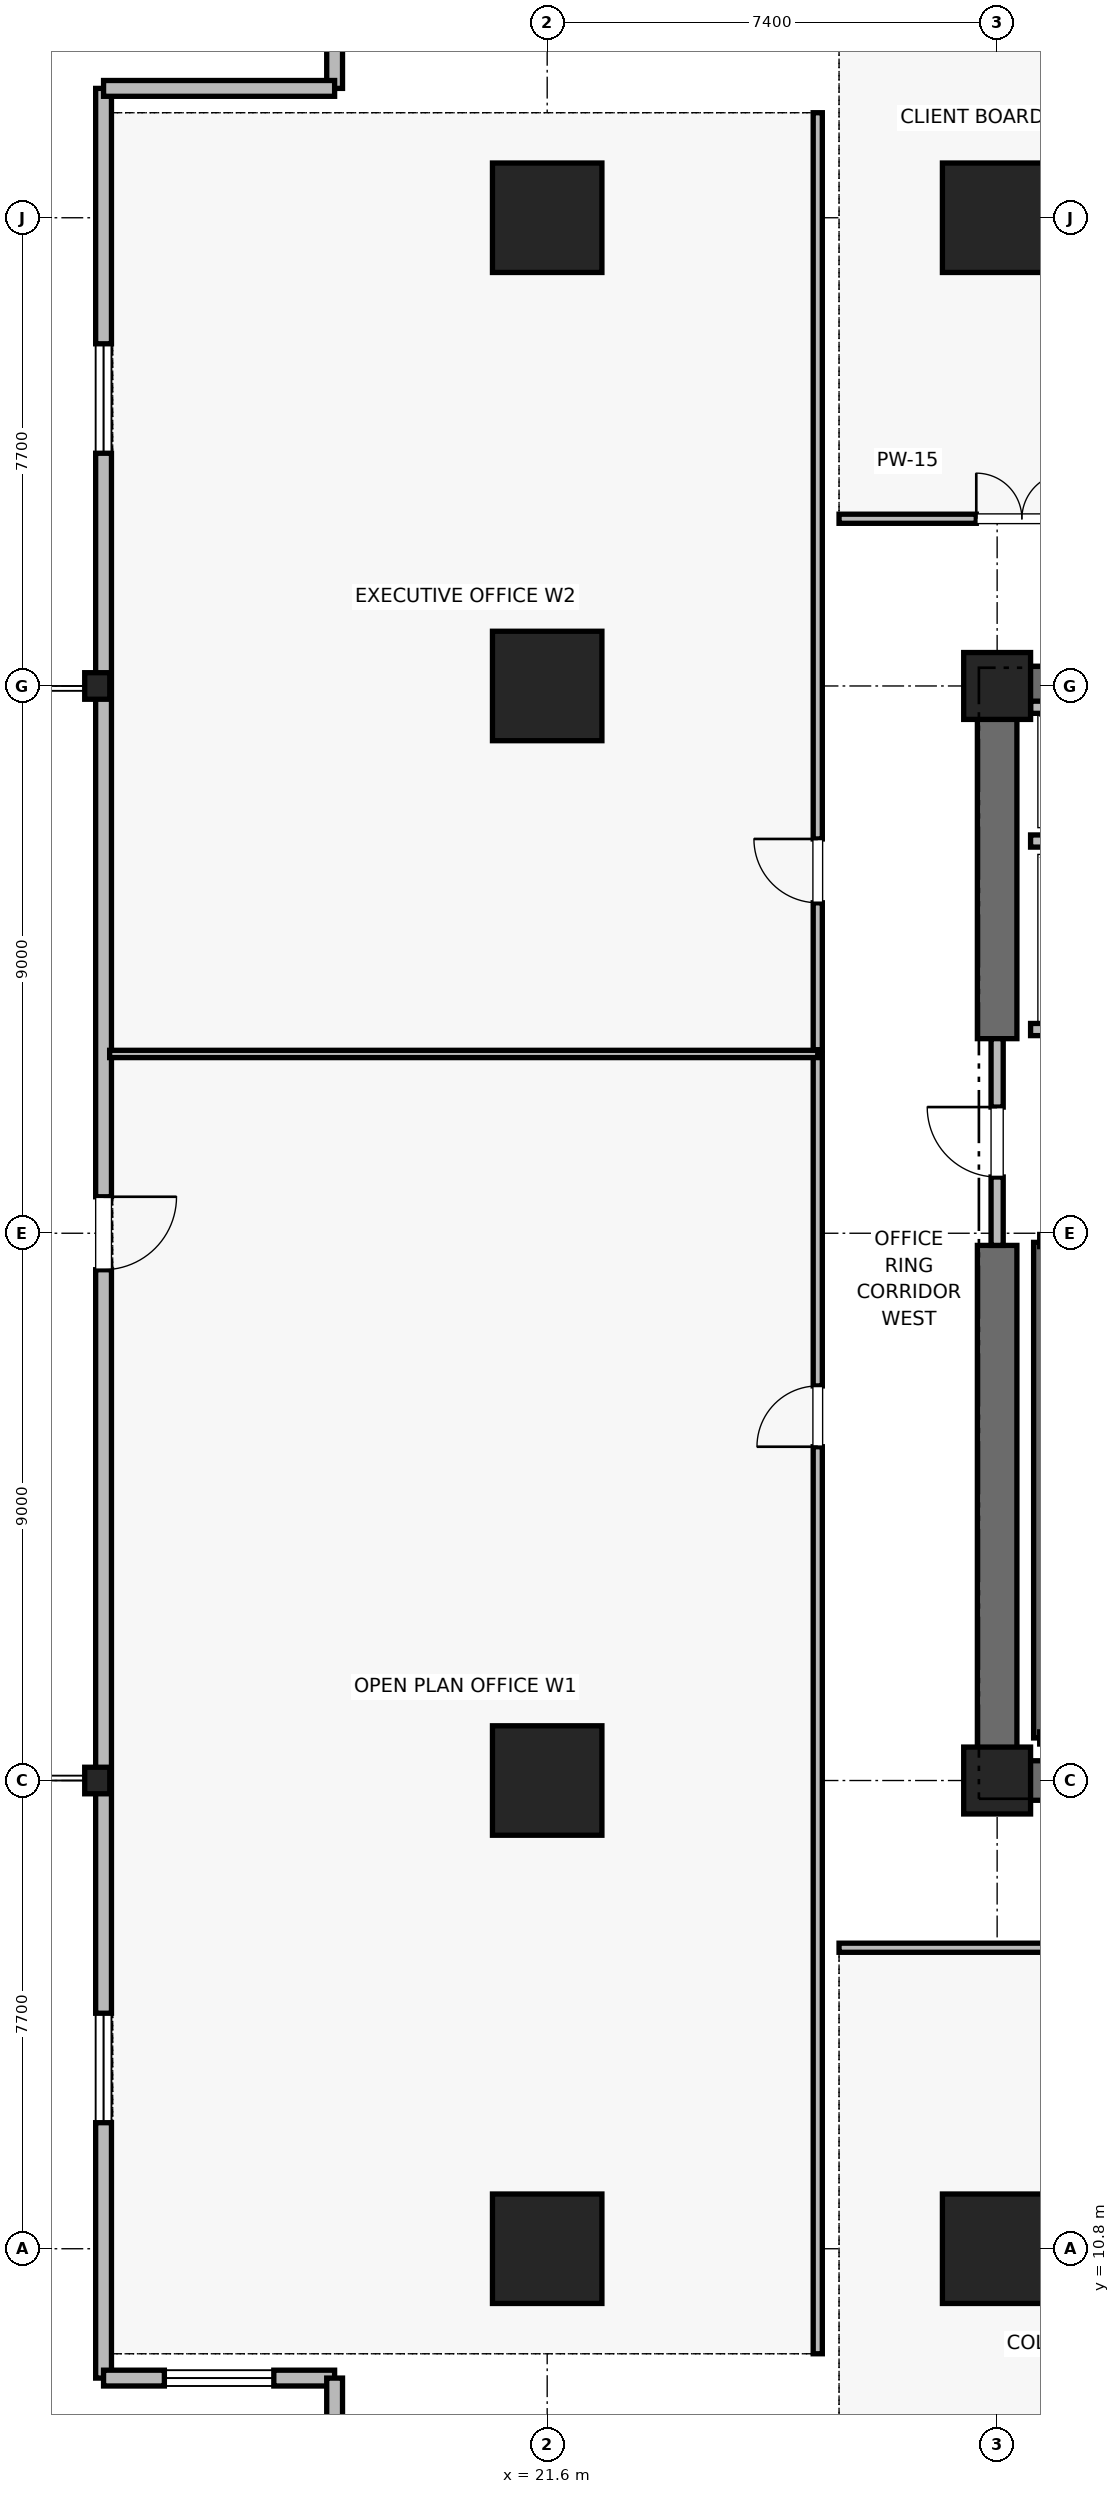
"""IFC4 building model, lengths in metres.
Left out: names, types, materials, properties, quantities, classifications, styles, units other than length and angle.
Written with IfcOpenShell. Run it as: python <this file> out.ifc"""

import sys

from ifc_helpers import new_model, si_unit, direction, frame, frame_2d, origin, origin_2d, place, context, subcontext, project, spatial, rectangle, i_section, extrude, element, fill, save


model = new_model("IFC4")
c1 = context("Model", 3, precision=1e-05, world=origin(), true_north=direction((0.0, 1.0)))
c2 = subcontext(c1, "Body", "Model", "MODEL_VIEW")
j1 = project(units=[si_unit("LENGTHUNIT", "METRE"), si_unit("PLANEANGLEUNIT", "RADIAN")], contexts=[c1])
p1 = place(None, origin())
s1 = spatial("IfcSite", under=j1, at=p1, CompositionType="ELEMENT")
p2 = place(p1, origin())
s2 = spatial("IfcBuilding", under=s1, at=p2, CompositionType="ELEMENT")
p3 = place(p2, frame((0.0, 0.0, 55.6)))
s3 = spatial("IfcBuildingStorey", under=s2, at=p3, CompositionType="ELEMENT", Elevation=55.6)
for number, where, z_axis, x_axis in (
    (1, (29.0, 10.8, 0.0), (0.0, 0.0, 1.0), (1.0, 0.0, 0.0)),
    (2, (29.0, 44.2, 0.0), (0.0, 0.0, 1.0), (1.0, 0.0, 0.0)),
    (3, (21.6, 18.5, 0.0), (0.0, 0.0, 1.0), (1.0, 0.0, 0.0)),
    (4, (21.6, 36.5, 0.0), (0.0, 0.0, 1.0), (1.0, 0.0, 0.0)),
    (5, (21.6, 10.8, 0.0), (0.0, 0.0, 1.0), (1.0, 0.0, 0.0)),
    (6, (21.6, 44.2, 0.0), (0.0, 0.0, 1.0), (1.0, 0.0, 0.0)),
):
    element("IfcColumn", number, at=place(p3, frame(where, z_axis=z_axis, x_axis=x_axis)), inside=s3, PredefinedType="COLUMN", context=c2, shape_type="SweptSolid", body=[
        extrude(rectangle(XDim=1.8, YDim=1.8, at=origin_2d()), origin(), (0.0, 0.0, 1.0), 4.0),
    ])
for number, where, z_axis, x_axis in (
    (7, (14.2, 18.5, 0.0), (0.0, 0.0, 1.0), (1.0, 0.0, 0.0)),
    (8, (14.2, 36.5, 0.0), (0.0, 0.0, 1.0), (1.0, 0.0, 0.0)),
):
    element("IfcColumn", number, at=place(p3, frame(where, z_axis=z_axis, x_axis=x_axis)), inside=s3, PredefinedType="COLUMN", context=c2, shape_type="SweptSolid", body=[
        extrude(i_section(OverallWidth=0.412, OverallDepth=0.437, WebThickness=0.036, FlangeThickness=0.058, FilletRadius=0.015, at=origin_2d()), origin(), (0.0, 0.0, 1.0), 4.0),
    ])
for number, where, z_axis, x_axis in (
    (9, (29.0, 18.5, 0.0), (0.0, 0.0, 1.0), (1.0, 0.0, 0.0)),
    (10, (29.0, 36.5, 0.0), (0.0, 0.0, 1.0), (1.0, 0.0, 0.0)),
):
    element("IfcColumn", number, at=place(p3, frame(where, z_axis=z_axis, x_axis=x_axis)), inside=s3, PredefinedType="PILASTER", context=c2, shape_type="SweptSolid", body=[
        extrude(rectangle(XDim=1.1, YDim=1.1, at=origin_2d()), origin(), (0.0, 0.0, 1.0), 4.0),
    ])
p4 = place(p3, frame((29.0, 18.5, 0.0), z_axis=(0.0, 0.0, 1.0), x_axis=(1.0, 0.0, 0.0)))
e11 = element("IfcWall", 11, at=p4, inside=s3, PredefinedType="SHEAR", context=c2, shape_type="SweptSolid", body=[
    extrude(rectangle(XDim=9.2, YDim=0.65, at=frame_2d((4.6, 0.0))), origin(), (0.0, 0.0, 1.0), 3.76),
])
p5 = place(p3, frame((29.0, 36.5, 0.0), z_axis=(0.0, 0.0, 1.0), x_axis=(1.0, 0.0, 0.0)))
e12 = element("IfcWall", 12, at=p5, inside=s3, PredefinedType="SHEAR", context=c2, shape_type="SweptSolid", body=[
    extrude(rectangle(XDim=5.8, YDim=0.65, at=frame_2d((2.9, 0.0))), origin(), (0.0, 0.0, 1.0), 3.76),
])
p6 = place(p3, frame((29.0, 18.5, 0.0), z_axis=(0.0, 0.0, 1.0), x_axis=(0.0, 1.0, 0.0)))
e13 = element("IfcWall", 13, at=p6, inside=s3, PredefinedType="SHEAR", context=c2, shape_type="SweptSolid", body=[
    extrude(rectangle(XDim=8.8, YDim=0.65, at=frame_2d((4.4, 0.0))), origin(), (0.0, 0.0, 1.0), 3.76),
])
p7 = place(p3, frame((29.0, 30.7, 0.0), z_axis=(0.0, 0.0, 1.0), x_axis=(0.0, 1.0, 0.0)))
e14 = element("IfcWall", 14, at=p7, inside=s3, PredefinedType="SHEAR", context=c2, shape_type="SweptSolid", body=[
    extrude(rectangle(XDim=5.8, YDim=0.65, at=frame_2d((2.9, 0.0))), origin(), (0.0, 0.0, 1.0), 3.76),
])
p8 = place(p3, frame((14.304, 46.327, 0.0), z_axis=(0.0, 0.0, 1.0), x_axis=(0.0, -1.0, 0.0)))
e15 = element("IfcWall", 15, at=p8, inside=s3, PredefinedType="PARAPET", context=c2, shape_type="SweptSolid", body=[
    extrude(rectangle(XDim=37.654, YDim=0.26, at=frame_2d((18.827, 0.0))), origin(), (0.0, 0.0, 1.0), 2.889),
])
p9 = place(p8, frame((4.2, 0.0, 0.85)))
e16 = element("IfcOpeningElement", 16, at=p9, cuts=e15, PredefinedType="OPENING", context=c2, shape_type="SweptSolid", body=[
    extrude(rectangle(XDim=1.8, YDim=2.2, at=frame_2d((0.9, 1.1))), frame((0.0, 0.13, 0.0), z_axis=(0.0, -1.0, 0.0), x_axis=(1.0, 0.0, 0.0)), (0.0, 0.0, 1.0), 0.26),
])
p10 = place(p8, frame((18.227, 0.0, 0.0)))
e17 = element("IfcOpeningElement", 17, at=p10, cuts=e15, PredefinedType="OPENING", context=c2, shape_type="SweptSolid", body=[
    extrude(rectangle(XDim=1.2, YDim=2.2, at=frame_2d((0.6, 1.1))), frame((0.0, 0.13, 0.0), z_axis=(0.0, -1.0, 0.0), x_axis=(1.0, 0.0, 0.0)), (0.0, 0.0, 1.0), 0.26),
])
p11 = place(p8, frame((31.654, 0.0, 0.85)))
e18 = element("IfcOpeningElement", 18, at=p11, cuts=e15, PredefinedType="OPENING", context=c2, shape_type="SweptSolid", body=[
    extrude(rectangle(XDim=1.8, YDim=2.2, at=frame_2d((0.9, 1.1))), frame((0.0, 0.13, 0.0), z_axis=(0.0, -1.0, 0.0), x_axis=(1.0, 0.0, 0.0)), (0.0, 0.0, 1.0), 0.26),
])
p12 = place(p3, frame((14.304, 8.673, 0.0), z_axis=(0.0, 0.0, 1.0), x_axis=(1.0, 0.0, 0.0)))
e19 = element("IfcWall", 19, at=p12, inside=s3, PredefinedType="PARAPET", context=c2, shape_type="SweptSolid", body=[
    extrude(rectangle(XDim=3.8, YDim=0.26, at=frame_2d((1.9, 0.0))), origin(), (0.0, 0.0, 1.0), 3.76),
])
p13 = place(p12, frame((1.0, 0.0, 0.85)))
e20 = element("IfcOpeningElement", 20, at=p13, cuts=e19, PredefinedType="OPENING", context=c2, shape_type="SweptSolid", body=[
    extrude(rectangle(XDim=1.8, YDim=2.2, at=frame_2d((0.9, 1.1))), frame((0.0, 0.13, 0.0), z_axis=(0.0, -1.0, 0.0), x_axis=(1.0, 0.0, 0.0)), (0.0, 0.0, 1.0), 0.26),
])
p14 = place(p3, frame((18.104, 8.673, 0.0), z_axis=(0.0, 0.0, 1.0), x_axis=(0.0, -1.0, 0.0)))
e21 = element("IfcWall", 21, at=p14, inside=s3, PredefinedType="PARAPET", context=c2, shape_type="SweptSolid", body=[
    extrude(rectangle(XDim=3.4, YDim=0.26, at=frame_2d((1.7, 0.0))), origin(), (0.0, 0.0, 1.0), 3.76),
])
p15 = place(p3, frame((18.104, 49.727, 0.0), z_axis=(0.0, 0.0, 1.0), x_axis=(0.0, -1.0, 0.0)))
e22 = element("IfcWall", 22, at=p15, inside=s3, PredefinedType="PARAPET", context=c2, shape_type="SweptSolid", body=[
    extrude(rectangle(XDim=3.4, YDim=0.26, at=frame_2d((1.7, 0.0))), origin(), (0.0, 0.0, 1.0), 3.76),
])
p16 = place(p15, frame((0.8, 0.0, 0.85)))
e23 = element("IfcOpeningElement", 23, at=p16, cuts=e22, PredefinedType="OPENING", context=c2, shape_type="SweptSolid", body=[
    extrude(rectangle(XDim=1.8, YDim=2.2, at=frame_2d((0.9, 1.1))), frame((0.0, 0.13, 0.0), z_axis=(0.0, -1.0, 0.0), x_axis=(1.0, 0.0, 0.0)), (0.0, 0.0, 1.0), 0.26),
])
p17 = place(p3, frame((18.104, 46.327, 0.0), z_axis=(0.0, 0.0, 1.0), x_axis=(-1.0, 0.0, 0.0)))
e24 = element("IfcWall", 24, at=p17, inside=s3, PredefinedType="PARAPET", context=c2, shape_type="SweptSolid", body=[
    extrude(rectangle(XDim=3.8, YDim=0.26, at=frame_2d((1.9, 0.0))), origin(), (0.0, 0.0, 1.0), 3.76),
])
p18 = place(p3, frame((29.7, 19.2, 0.0), z_axis=(0.0, 0.0, 1.0), x_axis=(0.0, 1.0, 0.0)))
e25 = element("IfcWall", 25, at=p18, inside=s3, PredefinedType="SOLIDWALL", context=c2, shape_type="SweptSolid", body=[
    extrude(rectangle(XDim=8.15, YDim=0.2, at=frame_2d((4.075, 0.0))), origin(), (0.0, 0.0, 1.0), 3.76),
])
p19 = place(p3, frame((29.0, 27.3, 0.0), z_axis=(0.0, 0.0, 1.0), x_axis=(0.0, 1.0, 0.0)))
e26 = element("IfcWall", 26, at=p19, inside=s3, PredefinedType="PARTITIONING", context=c2, shape_type="SweptSolid", body=[
    extrude(rectangle(XDim=3.4, YDim=0.2, at=frame_2d((1.7, 0.0))), origin(), (0.0, 0.0, 1.0), 2.54),
])
p20 = place(p19, frame((1.125, 0.0, 0.0)))
e27 = element("IfcOpeningElement", 27, at=p20, cuts=e26, PredefinedType="OPENING", context=c2, shape_type="SweptSolid", body=[
    extrude(rectangle(XDim=1.15, YDim=2.2, at=frame_2d((0.575, 1.1))), frame((0.0, 0.1, 0.0), z_axis=(0.0, -1.0, 0.0), x_axis=(1.0, 0.0, 0.0)), (0.0, 0.0, 1.0), 0.2),
])
p21 = place(p3, frame((29.55, 30.85, 0.0), z_axis=(0.0, 0.0, 1.0), x_axis=(1.0, 0.0, 0.0)))
e28 = element("IfcWall", 28, at=p21, inside=s3, PredefinedType="SOLIDWALL", context=c2, shape_type="SweptSolid", body=[
    extrude(rectangle(XDim=2.6, YDim=0.2, at=frame_2d((1.3, 0.0))), origin(), (0.0, 0.0, 1.0), 2.54),
])
p22 = place(p21, frame((0.75, 0.0, 0.0)))
e29 = element("IfcOpeningElement", 29, at=p22, cuts=e28, PredefinedType="OPENING", context=c2, shape_type="SweptSolid", body=[
    extrude(rectangle(XDim=1.1, YDim=2.2, at=frame_2d((0.55, 1.1))), frame((0.0, 0.1, 0.0), z_axis=(0.0, -1.0, 0.0), x_axis=(1.0, 0.0, 0.0)), (0.0, 0.0, 1.0), 0.2),
])
p23 = place(p3, frame((29.55, 33.95, 0.0), z_axis=(0.0, 0.0, 1.0), x_axis=(1.0, 0.0, 0.0)))
e30 = element("IfcWall", 30, at=p23, inside=s3, PredefinedType="SOLIDWALL", context=c2, shape_type="SweptSolid", body=[
    extrude(rectangle(XDim=2.8, YDim=0.2, at=frame_2d((1.4, 0.0))), origin(), (0.0, 0.0, 1.0), 3.76),
])
p24 = place(p3, frame((32.35, 36.15, 0.0), z_axis=(0.0, 0.0, 1.0), x_axis=(-1.0, 0.0, 0.0)))
e31 = element("IfcWall", 31, at=p24, inside=s3, PredefinedType="SOLIDWALL", context=c2, shape_type="SweptSolid", body=[
    extrude(rectangle(XDim=2.8, YDim=0.2, at=frame_2d((1.4, 0.0))), origin(), (0.0, 0.0, 1.0), 2.889),
])
p25 = place(p3, frame((26.4, 39.25, 0.0), z_axis=(0.0, 0.0, 1.0), x_axis=(1.0, 0.0, 0.0)))
e32 = element("IfcWall", 32, at=p25, inside=s3, PredefinedType="PARTITIONING", context=c2, shape_type="SweptSolid", body=[
    extrude(rectangle(XDim=5.984, YDim=0.15, at=frame_2d((2.992, 0.0))), origin(), (0.0, 0.0, 1.0), 2.85),
])
p26 = place(p25, frame((2.257, 0.0, 0.0)))
e33 = element("IfcOpeningElement", 33, at=p26, cuts=e32, PredefinedType="OPENING", context=c2, shape_type="SweptSolid", body=[
    extrude(rectangle(XDim=1.5, YDim=2.25, at=frame_2d((0.75, 1.125))), frame((0.0, 0.075, 0.0), z_axis=(0.0, -1.0, 0.0), x_axis=(1.0, 0.0, 0.0)), (0.0, 0.0, 1.0), 0.15),
])
p27 = place(p3, frame((26.4, 15.75, 0.0), z_axis=(0.0, 0.0, 1.0), x_axis=(1.0, 0.0, 0.0)))
e34 = element("IfcWall", 34, at=p27, inside=s3, PredefinedType="PARTITIONING", context=c2, shape_type="SweptSolid", body=[
    extrude(rectangle(XDim=11.424, YDim=0.15, at=frame_2d((5.712, 0.0))), origin(), (0.0, 0.0, 1.0), 2.85),
])
p28 = place(p27, frame((5.227, 0.0, 0.0)))
e35 = element("IfcOpeningElement", 35, at=p28, cuts=e34, PredefinedType="OPENING", context=c2, shape_type="SweptSolid", body=[
    extrude(rectangle(XDim=1.0, YDim=2.15, at=frame_2d((0.5, 1.075))), frame((0.0, 0.075, 0.0), z_axis=(0.0, -1.0, 0.0), x_axis=(1.0, 0.0, 0.0)), (0.0, 0.0, 1.0), 0.15),
])
p29 = place(p3, frame((26.05, 9.073, 0.0), z_axis=(0.0, 0.0, 1.0), x_axis=(0.0, 1.0, 0.0)))
e36 = element("IfcWall", 36, at=p29, inside=s3, PredefinedType="PARTITIONING", context=c2, shape_type="SweptSolid", body=[
    extrude(rectangle(XDim=21.376, YDim=0.15, at=frame_2d((10.688, 0.0))), origin(), (0.0, 0.0, 1.0), 2.85),
])
p30 = place(p29, frame((14.917, 0.0, 0.0)))
e37 = element("IfcOpeningElement", 37, at=p30, cuts=e36, PredefinedType="OPENING", context=c2, shape_type="SweptSolid", body=[
    extrude(rectangle(XDim=1.0, YDim=2.15, at=frame_2d((0.5, 1.075))), frame((0.0, 0.075, 0.0), z_axis=(0.0, -1.0, 0.0), x_axis=(1.0, 0.0, 0.0)), (0.0, 0.0, 1.0), 0.15),
])
p31 = place(p3, frame((14.404, 30.448, 0.0), z_axis=(0.0, 0.0, 1.0), x_axis=(1.0, 0.0, 0.0)))
e38 = element("IfcWall", 38, at=p31, inside=s3, PredefinedType="PARTITIONING", context=c2, shape_type="SweptSolid", body=[
    extrude(rectangle(XDim=11.646, YDim=0.12, at=frame_2d((5.823, 0.0))), origin(), (0.0, 0.0, 1.0), 2.85),
])
p32 = place(p3, frame((26.05, 30.518, 0.0), z_axis=(0.0, 0.0, 1.0), x_axis=(0.0, 1.0, 0.0)))
e39 = element("IfcWall", 39, at=p32, inside=s3, PredefinedType="PARTITIONING", context=c2, shape_type="SweptSolid", body=[
    extrude(rectangle(XDim=15.409, YDim=0.15, at=frame_2d((7.705, 0.0))), origin(), (0.0, 0.0, 1.0), 2.85),
])
p33 = place(p32, frame((2.416, 0.0, 0.0)))
e40 = element("IfcOpeningElement", 40, at=p33, cuts=e39, PredefinedType="OPENING", context=c2, shape_type="SweptSolid", body=[
    extrude(rectangle(XDim=1.05, YDim=2.2, at=frame_2d((0.525, 1.1))), frame((0.0, 0.075, 0.0), z_axis=(0.0, -1.0, 0.0), x_axis=(1.0, 0.0, 0.0)), (0.0, 0.0, 1.0), 0.15),
])
p34 = place(p9, origin())
e41 = element("IfcWindow", 41, at=p34, inside=s3, PartitioningType="SINGLE_PANEL", PredefinedType="WINDOW", context=c2, shape_type="SweptSolid", body=[
    extrude(rectangle(XDim=1.8, YDim=2.2, at=frame_2d((0.9, 1.1))), frame((0.0, 0.03, 0.0), z_axis=(0.0, -1.0, 0.0), x_axis=(1.0, 0.0, 0.0)), (0.0, 0.0, 1.0), 0.06),
])
fill(e16, e41)
p35 = place(p10, origin())
e42 = element("IfcDoor", 42, at=p35, inside=s3, OperationType="SINGLE_SWING_LEFT", PredefinedType="DOOR", context=c2, shape_type="SweptSolid", body=[
    extrude(rectangle(XDim=1.2, YDim=2.2, at=frame_2d((0.6, 1.1))), frame((0.0, 0.025, 0.0), z_axis=(0.0, -1.0, 0.0), x_axis=(1.0, 0.0, 0.0)), (0.0, 0.0, 1.0), 0.05),
])
fill(e17, e42)
p36 = place(p11, origin())
e43 = element("IfcWindow", 43, at=p36, inside=s3, PartitioningType="SINGLE_PANEL", PredefinedType="WINDOW", context=c2, shape_type="SweptSolid", body=[
    extrude(rectangle(XDim=1.8, YDim=2.2, at=frame_2d((0.9, 1.1))), frame((0.0, 0.03, 0.0), z_axis=(0.0, -1.0, 0.0), x_axis=(1.0, 0.0, 0.0)), (0.0, 0.0, 1.0), 0.06),
])
fill(e18, e43)
p37 = place(p13, origin())
e44 = element("IfcWindow", 44, at=p37, inside=s3, PartitioningType="SINGLE_PANEL", PredefinedType="WINDOW", context=c2, shape_type="SweptSolid", body=[
    extrude(rectangle(XDim=1.8, YDim=2.2, at=frame_2d((0.9, 1.1))), frame((0.0, 0.03, 0.0), z_axis=(0.0, -1.0, 0.0), x_axis=(1.0, 0.0, 0.0)), (0.0, 0.0, 1.0), 0.06),
])
fill(e20, e44)
p38 = place(p20, origin())
e45 = element("IfcDoor", 45, at=p38, inside=s3, OperationType="SINGLE_SWING_RIGHT", PredefinedType="DOOR", context=c2, shape_type="SweptSolid", body=[
    extrude(rectangle(XDim=1.15, YDim=2.2, at=frame_2d((0.575, 1.1))), frame((0.0, 0.025, 0.0), z_axis=(0.0, -1.0, 0.0), x_axis=(1.0, 0.0, 0.0)), (0.0, 0.0, 1.0), 0.05),
])
fill(e27, e45)
p39 = place(p26, origin())
e46 = element("IfcDoor", 46, at=p39, inside=s3, OperationType="DOUBLE_DOOR_SINGLE_SWING", PredefinedType="DOOR", context=c2, shape_type="SweptSolid", body=[
    extrude(rectangle(XDim=1.5, YDim=2.25, at=frame_2d((0.75, 1.125))), frame((0.0, 0.025, 0.0), z_axis=(0.0, -1.0, 0.0), x_axis=(1.0, 0.0, 0.0)), (0.0, 0.0, 1.0), 0.05),
])
fill(e33, e46)
p40 = place(p30, origin())
e47 = element("IfcDoor", 47, at=p40, inside=s3, OperationType="SINGLE_SWING_LEFT", PredefinedType="DOOR", context=c2, shape_type="SweptSolid", body=[
    extrude(rectangle(XDim=1.0, YDim=2.15, at=frame_2d((0.5, 1.075))), frame((0.0, 0.025, 0.0), z_axis=(0.0, -1.0, 0.0), x_axis=(1.0, 0.0, 0.0)), (0.0, 0.0, 1.0), 0.05),
])
fill(e37, e47)
p41 = place(p33, origin())
e48 = element("IfcDoor", 48, at=p41, inside=s3, OperationType="SINGLE_SWING_RIGHT", PredefinedType="DOOR", context=c2, shape_type="SweptSolid", body=[
    extrude(rectangle(XDim=1.05, YDim=2.2, at=frame_2d((0.525, 1.1))), frame((0.0, 0.025, 0.0), z_axis=(0.0, -1.0, 0.0), x_axis=(1.0, 0.0, 0.0)), (0.0, 0.0, 1.0), 0.05),
])
fill(e40, e48)
save(model, sys.argv[1])
